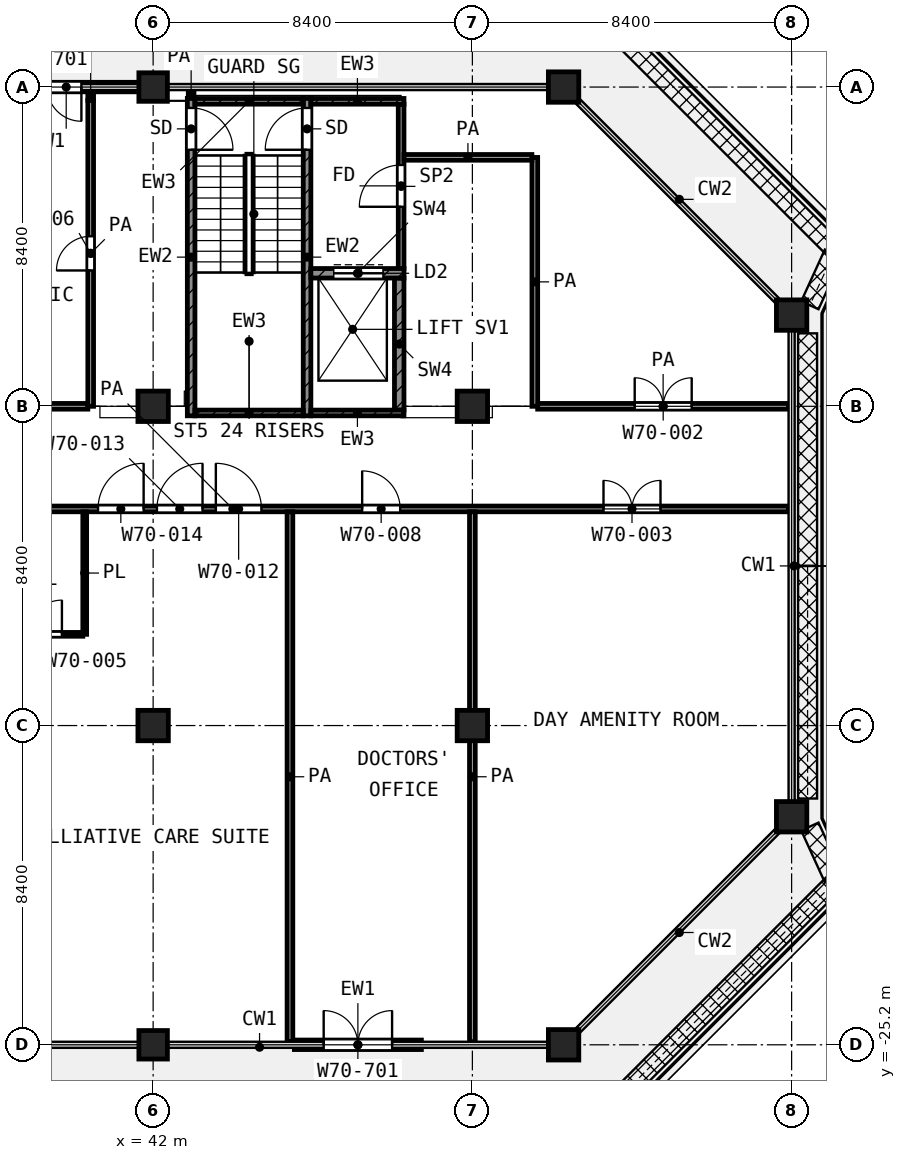
"""IFC4 building model, lengths in metres.
Left out: names, types, materials, properties, quantities, classifications, styles, units other than length and angle.
Written with IfcOpenShell. Run it as: python <this file> out.ifc"""

import sys

from ifc_helpers import new_model, si_unit, direction, frame, frame_2d, origin, origin_2d, place, context, subcontext, project, spatial, rectangle, extrude, element, fill, save


model = new_model("IFC4")
c1 = context("Model", 3, precision=1e-05, world=origin(), true_north=direction((0.0, 1.0)))
c2 = subcontext(c1, "Body", "Model", "MODEL_VIEW")
j1 = project(units=[si_unit("LENGTHUNIT", "METRE"), si_unit("PLANEANGLEUNIT", "RADIAN")], contexts=[c1])
p1 = place(None, origin())
s1 = spatial("IfcSite", under=j1, at=p1, CompositionType="ELEMENT")
p2 = place(p1, origin())
s2 = spatial("IfcBuilding", under=s1, at=p2, CompositionType="ELEMENT")
p3 = place(p2, frame((0.0, 0.0, 323.8)))
s3 = spatial("IfcBuildingStorey", under=s2, at=p3, CompositionType="ELEMENT", Elevation=323.8)
p4 = place(p3, frame((42.0, 0.0, 0.0), z_axis=(0.0, 0.0, 1.0), x_axis=(1.0, 0.0, 0.0)))
e1 = element("IfcColumn", 1, at=p4, inside=s3, PredefinedType="COLUMN", context=c2, shape_type="SweptSolid", body=[
    extrude(rectangle(XDim=0.75, YDim=0.75, at=origin_2d()), origin(), (0.0, 0.0, 1.0), 4.2),
])
for number, where, z_axis, x_axis in (
    (2, (52.8, 0.0, 0.0), (0.0, 0.0, 1.0), (1.0, 0.0, 0.0)),
    (3, (58.8, -6.0, 0.0), (0.0, 0.0, 1.0), (1.0, 0.0, 0.0)),
    (4, (42.0, -8.4, 0.0), (0.0, 0.0, 1.0), (1.0, 0.0, 0.0)),
    (5, (50.4, -8.4, 0.0), (0.0, 0.0, 1.0), (1.0, 0.0, 0.0)),
    (6, (42.0, -16.8, 0.0), (0.0, 0.0, 1.0), (1.0, 0.0, 0.0)),
    (7, (50.4, -16.8, 0.0), (0.0, 0.0, 1.0), (1.0, 0.0, 0.0)),
    (8, (58.8, -19.2, 0.0), (0.0, 0.0, 1.0), (1.0, 0.0, 0.0)),
):
    element("IfcColumn", number, at=place(p3, frame(where, z_axis=z_axis, x_axis=x_axis)), inside=s3, PredefinedType="COLUMN", context=c2, shape_type="SweptSolid", body=[
        extrude(rectangle(XDim=0.8, YDim=0.8, at=origin_2d()), origin(), (0.0, 0.0, 1.0), 4.2),
    ])
p5 = place(p3, frame((42.0, -25.2, 0.0), z_axis=(0.0, 0.0, 1.0), x_axis=(1.0, 0.0, 0.0)))
e9 = element("IfcColumn", 9, at=p5, inside=s3, PredefinedType="COLUMN", context=c2, shape_type="SweptSolid", body=[
    extrude(rectangle(XDim=0.75, YDim=0.75, at=origin_2d()), origin(), (0.0, 0.0, 1.0), 4.2),
])
p6 = place(p3, frame((52.8, -25.2, 0.0), z_axis=(0.0, 0.0, 1.0), x_axis=(1.0, 0.0, 0.0)))
e10 = element("IfcColumn", 10, at=p6, inside=s3, PredefinedType="COLUMN", context=c2, shape_type="SweptSolid", body=[
    extrude(rectangle(XDim=0.8, YDim=0.8, at=origin_2d()), origin(), (0.0, 0.0, 1.0), 4.2),
])
p7 = place(p3, frame((45.717, -25.2, 0.0), z_axis=(0.0, 0.0, 1.0), x_axis=(1.0, 0.0, 0.0)))
e11 = element("IfcWall", 11, at=p7, inside=s3, PredefinedType="SOLIDWALL", context=c2, shape_type="SweptSolid", body=[
    extrude(rectangle(XDim=3.342, YDim=0.25, at=frame_2d((1.671, 0.0))), origin(), (0.0, 0.0, 1.0), 3.48),
])
p8 = place(p7, frame((0.771, 0.0, 0.0)))
e12 = element("IfcOpeningElement", 12, at=p8, cuts=e11, PredefinedType="OPENING", context=c2, shape_type="SweptSolid", body=[
    extrude(rectangle(XDim=1.8, YDim=2.1, at=frame_2d((0.9, 1.05))), frame((0.0, 0.135, 0.0), z_axis=(0.0, -1.0, 0.0), x_axis=(1.0, 0.0, 0.0)), (0.0, 0.0, 1.0), 0.27),
])
p9 = place(p3, frame((41.625, 0.0, 0.0), z_axis=(0.0, 0.0, 1.0), x_axis=(-1.0, 0.0, 0.0)))
e13 = element("IfcWall", 13, at=p9, inside=s3, PredefinedType="SOLIDWALL", context=c2, shape_type="SweptSolid", body=[
    extrude(rectangle(XDim=3.825, YDim=0.25, at=frame_2d((1.913, 0.0))), origin(), (0.0, 0.0, 1.0), 3.48),
])
p10 = place(p9, frame((1.512, 0.0, 0.0)))
e14 = element("IfcOpeningElement", 14, at=p10, cuts=e13, PredefinedType="OPENING", context=c2, shape_type="SweptSolid", body=[
    extrude(rectangle(XDim=1.8, YDim=2.1, at=frame_2d((0.9, 1.05))), frame((0.0, 0.135, 0.0), z_axis=(0.0, -1.0, 0.0), x_axis=(1.0, 0.0, 0.0)), (0.0, 0.0, 1.0), 0.27),
])
p11 = place(p3, frame((43.0, -8.65, 0.0), z_axis=(0.0, 0.0, 1.0), x_axis=(0.0, 1.0, 0.0)))
e15 = element("IfcWall", 15, at=p11, inside=s3, PredefinedType="SHEAR", context=c2, shape_type="SweptSolid", body=[
    extrude(rectangle(XDim=8.35, YDim=0.2, at=frame_2d((4.175, 0.0))), origin(), (0.0, 0.0, 1.0), 3.6),
])
p12 = place(p11, frame((7.0, 0.0, 0.0)))
e16 = element("IfcOpeningElement", 16, at=p12, cuts=e15, PredefinedType="OPENING", context=c2, shape_type="SweptSolid", body=[
    extrude(rectangle(XDim=1.1, YDim=2.1, at=frame_2d((0.55, 1.05))), frame((0.0, 0.11, 0.0), z_axis=(0.0, -1.0, 0.0), x_axis=(1.0, 0.0, 0.0)), (0.0, 0.0, 1.0), 0.22),
])
p13 = place(p3, frame((46.05, -8.65, 0.0), z_axis=(0.0, 0.0, 1.0), x_axis=(0.0, 1.0, 0.0)))
e17 = element("IfcWall", 17, at=p13, inside=s3, PredefinedType="SHEAR", context=c2, shape_type="SweptSolid", body=[
    extrude(rectangle(XDim=8.35, YDim=0.2, at=frame_2d((4.175, 0.0))), origin(), (0.0, 0.0, 1.0), 3.6),
])
p14 = place(p13, frame((7.0, 0.0, 0.0)))
e18 = element("IfcOpeningElement", 18, at=p14, cuts=e17, PredefinedType="OPENING", context=c2, shape_type="SweptSolid", body=[
    extrude(rectangle(XDim=1.1, YDim=2.1, at=frame_2d((0.55, 1.05))), frame((0.0, 0.11, 0.0), z_axis=(0.0, -1.0, 0.0), x_axis=(1.0, 0.0, 0.0)), (0.0, 0.0, 1.0), 0.22),
])
p15 = place(p3, frame((43.1, -0.375, 0.0), z_axis=(0.0, 0.0, 1.0), x_axis=(1.0, 0.0, 0.0)))
e19 = element("IfcWall", 19, at=p15, inside=s3, PredefinedType="SHEAR", context=c2, shape_type="SweptSolid", body=[
    extrude(rectangle(XDim=2.85, YDim=0.15, at=frame_2d((1.425, 0.0))), origin(), (0.0, 0.0, 1.0), 3.6),
])
p16 = place(p3, frame((46.15, -0.375, 0.0), z_axis=(0.0, 0.0, 1.0), x_axis=(1.0, 0.0, 0.0)))
e20 = element("IfcWall", 20, at=p16, inside=s3, PredefinedType="SHEAR", context=c2, shape_type="SweptSolid", body=[
    extrude(rectangle(XDim=2.45, YDim=0.15, at=frame_2d((1.225, 0.0))), origin(), (0.0, 0.0, 1.0), 3.6),
])
p17 = place(p3, frame((43.1, -8.575, 0.0), z_axis=(0.0, 0.0, 1.0), x_axis=(1.0, 0.0, 0.0)))
e21 = element("IfcWall", 21, at=p17, inside=s3, PredefinedType="SHEAR", context=c2, shape_type="SweptSolid", body=[
    extrude(rectangle(XDim=2.85, YDim=0.15, at=frame_2d((1.425, 0.0))), origin(), (0.0, 0.0, 1.0), 3.6),
])
p18 = place(p3, frame((46.15, -8.575, 0.0), z_axis=(0.0, 0.0, 1.0), x_axis=(1.0, 0.0, 0.0)))
e22 = element("IfcWall", 22, at=p18, inside=s3, PredefinedType="SHEAR", context=c2, shape_type="SweptSolid", body=[
    extrude(rectangle(XDim=2.45, YDim=0.15, at=frame_2d((1.225, 0.0))), origin(), (0.0, 0.0, 1.0), 3.6),
])
p19 = place(p3, frame((46.15, -4.9, 0.0), z_axis=(0.0, 0.0, 1.0), x_axis=(1.0, 0.0, 0.0)))
e23 = element("IfcWall", 23, at=p19, inside=s3, PredefinedType="SHEAR", context=c2, shape_type="SweptSolid", body=[
    extrude(rectangle(XDim=2.45, YDim=0.25, at=frame_2d((1.225, 0.0))), origin(), (0.0, 0.0, 1.0), 3.6),
])
p20 = place(p19, frame((0.6, 0.0, 0.0)))
e24 = element("IfcOpeningElement", 24, at=p20, cuts=e23, PredefinedType="OPENING", context=c2, shape_type="SweptSolid", body=[
    extrude(rectangle(XDim=1.3, YDim=2.1, at=frame_2d((0.65, 1.05))), frame((0.0, 0.135, 0.0), z_axis=(0.0, -1.0, 0.0), x_axis=(1.0, 0.0, 0.0)), (0.0, 0.0, 1.0), 0.27),
])
p21 = place(p3, frame((48.475, -8.5, 0.0), z_axis=(0.0, 0.0, 1.0), x_axis=(0.0, 1.0, 0.0)))
e25 = element("IfcWall", 25, at=p21, inside=s3, PredefinedType="SHEAR", context=c2, shape_type="SweptSolid", body=[
    extrude(rectangle(XDim=3.475, YDim=0.25, at=frame_2d((1.738, 0.0))), origin(), (0.0, 0.0, 1.0), 3.6),
])
p22 = place(p3, frame((48.525, -4.775, 0.0), z_axis=(0.0, 0.0, 1.0), x_axis=(0.0, 1.0, 0.0)))
e26 = element("IfcWall", 26, at=p22, inside=s3, PredefinedType="PARTITIONING", context=c2, shape_type="SweptSolid", body=[
    extrude(rectangle(XDim=4.325, YDim=0.15, at=frame_2d((2.163, 0.0))), origin(), (0.0, 0.0, 1.0), 3.6),
])
p23 = place(p22, frame((1.625, 0.0, 0.0)))
e27 = element("IfcOpeningElement", 27, at=p23, cuts=e26, PredefinedType="OPENING", context=c2, shape_type="SweptSolid", body=[
    extrude(rectangle(XDim=1.1, YDim=2.1, at=frame_2d((0.55, 1.05))), frame((0.0, 0.085, 0.0), z_axis=(0.0, -1.0, 0.0), x_axis=(1.0, 0.0, 0.0)), (0.0, 0.0, 1.0), 0.17),
])
p24 = place(p3, frame((38.175, -14.4, 0.0), z_axis=(0.0, 0.0, 1.0), x_axis=(1.0, 0.0, 0.0)))
e28 = element("IfcWall", 28, at=p24, inside=s3, PredefinedType="PARTITIONING", context=c2, shape_type="SweptSolid", body=[
    extrude(rectangle(XDim=1.975, YDim=0.1, at=frame_2d((0.987, 0.0))), origin(), (0.0, 0.0, 1.0), 3.6),
])
p25 = place(p24, frame((0.525, 0.0, 0.0)))
e29 = element("IfcOpeningElement", 29, at=p25, cuts=e28, PredefinedType="OPENING", context=c2, shape_type="SweptSolid", body=[
    extrude(rectangle(XDim=0.9, YDim=2.1, at=frame_2d((0.45, 1.05))), frame((0.0, 0.06, 0.0), z_axis=(0.0, -1.0, 0.0), x_axis=(1.0, 0.0, 0.0)), (0.0, 0.0, 1.0), 0.12),
])
p26 = place(p3, frame((40.2, -14.4, 0.0), z_axis=(0.0, 0.0, 1.0), x_axis=(0.0, 1.0, 0.0)))
e30 = element("IfcWall", 30, at=p26, inside=s3, PredefinedType="PARTITIONING", context=c2, shape_type="SweptSolid", body=[
    extrude(rectangle(XDim=3.225, YDim=0.1, at=frame_2d((1.612, 0.0))), origin(), (0.0, 0.0, 1.0), 3.6),
])
p27 = place(p3, frame((29.475, -11.1, 0.0), z_axis=(0.0, 0.0, 1.0), x_axis=(1.0, 0.0, 0.0)))
e31 = element("IfcWall", 31, at=p27, inside=s3, PredefinedType="PARTITIONING", context=c2, shape_type="SweptSolid", body=[
    extrude(rectangle(XDim=29.245, YDim=0.15, at=frame_2d((14.623, 0.0))), origin(), (0.0, 0.0, 1.0), 3.6),
])
p28 = place(p27, frame((3.675, 0.0, 0.0)))
e32 = element("IfcOpeningElement", 32, at=p28, cuts=e31, PredefinedType="OPENING", context=c2, shape_type="SweptSolid", body=[
    extrude(rectangle(XDim=1.2, YDim=2.1, at=frame_2d((0.6, 1.05))), frame((0.0, 0.085, 0.0), z_axis=(0.0, -1.0, 0.0), x_axis=(1.0, 0.0, 0.0)), (0.0, 0.0, 1.0), 0.17),
])
p29 = place(p27, frame((14.175, 0.0, 0.0)))
e33 = element("IfcOpeningElement", 33, at=p29, cuts=e31, PredefinedType="OPENING", context=c2, shape_type="SweptSolid", body=[
    extrude(rectangle(XDim=1.2, YDim=2.1, at=frame_2d((0.6, 1.05))), frame((0.0, 0.085, 0.0), z_axis=(0.0, -1.0, 0.0), x_axis=(1.0, 0.0, 0.0)), (0.0, 0.0, 1.0), 0.17),
])
p30 = place(p27, frame((12.625, 0.0, 0.0)))
e34 = element("IfcOpeningElement", 34, at=p30, cuts=e31, PredefinedType="OPENING", context=c2, shape_type="SweptSolid", body=[
    extrude(rectangle(XDim=1.2, YDim=2.1, at=frame_2d((0.6, 1.05))), frame((0.0, 0.085, 0.0), z_axis=(0.0, -1.0, 0.0), x_axis=(1.0, 0.0, 0.0)), (0.0, 0.0, 1.0), 0.17),
])
p31 = place(p27, frame((11.075, 0.0, 0.0)))
e35 = element("IfcOpeningElement", 35, at=p31, cuts=e31, PredefinedType="OPENING", context=c2, shape_type="SweptSolid", body=[
    extrude(rectangle(XDim=1.2, YDim=2.1, at=frame_2d((0.6, 1.05))), frame((0.0, 0.085, 0.0), z_axis=(0.0, -1.0, 0.0), x_axis=(1.0, 0.0, 0.0)), (0.0, 0.0, 1.0), 0.17),
])
p32 = place(p27, frame((18.025, 0.0, 0.0)))
e36 = element("IfcOpeningElement", 36, at=p32, cuts=e31, PredefinedType="OPENING", context=c2, shape_type="SweptSolid", body=[
    extrude(rectangle(XDim=1.0, YDim=2.1, at=frame_2d((0.5, 1.05))), frame((0.0, 0.085, 0.0), z_axis=(0.0, -1.0, 0.0), x_axis=(1.0, 0.0, 0.0)), (0.0, 0.0, 1.0), 0.17),
])
p33 = place(p27, frame((24.375, 0.0, 0.0)))
e37 = element("IfcOpeningElement", 37, at=p33, cuts=e31, PredefinedType="OPENING", context=c2, shape_type="SweptSolid", body=[
    extrude(rectangle(XDim=1.5, YDim=2.1, at=frame_2d((0.75, 1.05))), frame((0.0, 0.085, 0.0), z_axis=(0.0, -1.0, 0.0), x_axis=(1.0, 0.0, 0.0)), (0.0, 0.0, 1.0), 0.17),
])
p34 = place(p3, frame((24.7, -8.4, 0.0), z_axis=(0.0, 0.0, 1.0), x_axis=(1.0, 0.0, 0.0)))
e38 = element("IfcWall", 38, at=p34, inside=s3, PredefinedType="PARTITIONING", context=c2, shape_type="SweptSolid", body=[
    extrude(rectangle(XDim=15.582, YDim=0.15, at=frame_2d((7.791, 0.0))), origin(), (0.0, 0.0, 1.0), 3.6),
])
p35 = place(p34, frame((9.35, 0.0, 0.0)))
e39 = element("IfcOpeningElement", 39, at=p35, cuts=e38, PredefinedType="OPENING", context=c2, shape_type="SweptSolid", body=[
    extrude(rectangle(XDim=1.1, YDim=2.1, at=frame_2d((0.55, 1.05))), frame((0.0, 0.085, 0.0), z_axis=(0.0, -1.0, 0.0), x_axis=(1.0, 0.0, 0.0)), (0.0, 0.0, 1.0), 0.17),
])
p36 = place(p34, frame((1.05, 0.0, 0.0)))
e40 = element("IfcOpeningElement", 40, at=p36, cuts=e38, PredefinedType="OPENING", context=c2, shape_type="SweptSolid", body=[
    extrude(rectangle(XDim=1.0, YDim=2.1, at=frame_2d((0.5, 1.05))), frame((0.0, 0.085, 0.0), z_axis=(0.0, -1.0, 0.0), x_axis=(1.0, 0.0, 0.0)), (0.0, 0.0, 1.0), 0.17),
])
p37 = place(p34, frame((5.15, 0.0, 0.0)))
e41 = element("IfcOpeningElement", 41, at=p37, cuts=e38, PredefinedType="OPENING", context=c2, shape_type="SweptSolid", body=[
    extrude(rectangle(XDim=1.2, YDim=2.1, at=frame_2d((0.6, 1.05))), frame((0.0, 0.085, 0.0), z_axis=(0.0, -1.0, 0.0), x_axis=(1.0, 0.0, 0.0)), (0.0, 0.0, 1.0), 0.17),
])
p38 = place(p3, frame((52.118, -8.4, 0.0), z_axis=(0.0, 0.0, 1.0), x_axis=(1.0, 0.0, 0.0)))
e42 = element("IfcWall", 42, at=p38, inside=s3, PredefinedType="PARTITIONING", context=c2, shape_type="SweptSolid", body=[
    extrude(rectangle(XDim=6.602, YDim=0.15, at=frame_2d((3.301, 0.0))), origin(), (0.0, 0.0, 1.0), 3.6),
])
p39 = place(p38, frame((2.553, 0.0, 0.0)))
e43 = element("IfcOpeningElement", 43, at=p39, cuts=e42, PredefinedType="OPENING", context=c2, shape_type="SweptSolid", body=[
    extrude(rectangle(XDim=1.5, YDim=2.1, at=frame_2d((0.75, 1.05))), frame((0.0, 0.085, 0.0), z_axis=(0.0, -1.0, 0.0), x_axis=(1.0, 0.0, 0.0)), (0.0, 0.0, 1.0), 0.17),
])
p40 = place(p3, frame((48.6, -1.85, 0.0), z_axis=(0.0, 0.0, 1.0), x_axis=(1.0, 0.0, 0.0)))
e44 = element("IfcWall", 44, at=p40, inside=s3, PredefinedType="PARTITIONING", context=c2, shape_type="SweptSolid", body=[
    extrude(rectangle(XDim=3.366, YDim=0.15, at=frame_2d((1.683, 0.0))), origin(), (0.0, 0.0, 1.0), 3.6),
])
p41 = place(p3, frame((40.357, -8.4, 0.0), z_axis=(0.0, 0.0, 1.0), x_axis=(0.0, 1.0, 0.0)))
e45 = element("IfcWall", 45, at=p41, inside=s3, PredefinedType="PARTITIONING", context=c2, shape_type="SweptSolid", body=[
    extrude(rectangle(XDim=8.048, YDim=0.15, at=frame_2d((4.024, 0.0))), origin(), (0.0, 0.0, 1.0), 3.6),
])
p42 = place(p41, frame((3.574, 0.0, 0.0)))
e46 = element("IfcOpeningElement", 46, at=p42, cuts=e45, PredefinedType="OPENING", context=c2, shape_type="SweptSolid", body=[
    extrude(rectangle(XDim=0.9, YDim=2.1, at=frame_2d((0.45, 1.05))), frame((0.0, 0.085, 0.0), z_axis=(0.0, -1.0, 0.0), x_axis=(1.0, 0.0, 0.0)), (0.0, 0.0, 1.0), 0.17),
])
p43 = place(p3, frame((40.357, -0.35, 0.0), z_axis=(0.0, 0.0, 1.0), x_axis=(0.0, 1.0, 0.0)))
e47 = element("IfcWall", 47, at=p43, inside=s3, PredefinedType="PARTITIONING", context=c2, shape_type="SweptSolid", body=[
    extrude(rectangle(XDim=0.27, YDim=0.15, at=frame_2d((0.135, 0.0))), origin(), (0.0, 0.0, 1.0), 3.6),
])
p44 = place(p3, frame((43.0, -0.27, 0.0), z_axis=(0.0, 0.0, 1.0), x_axis=(0.0, 1.0, 0.0)))
e48 = element("IfcWall", 48, at=p44, inside=s3, PredefinedType="PARTITIONING", context=c2, shape_type="SweptSolid", body=[
    extrude(rectangle(XDim=0.19, YDim=0.15, at=frame_2d((0.095, 0.0))), origin(), (0.0, 0.0, 1.0), 3.6),
])
for number, where, z_axis, x_axis in (
    (49, (45.6, -25.12, 0.0), (0.0, 0.0, 1.0), (0.0, 1.0, 0.0)),
    (50, (50.4, -25.12, 0.0), (0.0, 0.0, 1.0), (0.0, 1.0, 0.0)),
):
    element("IfcWall", number, at=place(p3, frame(where, z_axis=z_axis, x_axis=x_axis)), inside=s3, PredefinedType="PARTITIONING", context=c2, shape_type="SweptSolid", body=[
        extrude(rectangle(XDim=13.945, YDim=0.15, at=frame_2d((6.973, 0.0))), origin(), (0.0, 0.0, 1.0), 3.6),
    ])
p45 = place(p3, frame((52.043, -8.4, 0.0), z_axis=(0.0, 0.0, 1.0), x_axis=(0.0, 1.0, 0.0)))
e51 = element("IfcWall", 51, at=p45, inside=s3, PredefinedType="PARTITIONING", context=c2, shape_type="SweptSolid", body=[
    extrude(rectangle(XDim=6.548, YDim=0.15, at=frame_2d((3.274, 0.0))), origin(), (0.0, 0.0, 1.0), 3.6),
])
p46 = place(p8, origin())
e52 = element("IfcDoor", 52, at=p46, inside=s3, OperationType="DOUBLE_DOOR_SINGLE_SWING", PredefinedType="DOOR", context=c2, shape_type="SweptSolid", body=[
    extrude(rectangle(XDim=1.8, YDim=2.1, at=frame_2d((0.9, 1.05))), frame((0.0, 0.025, 0.0), z_axis=(0.0, -1.0, 0.0), x_axis=(1.0, 0.0, 0.0)), (0.0, 0.0, 1.0), 0.05),
])
fill(e12, e52)
p47 = place(p10, origin())
e53 = element("IfcDoor", 53, at=p47, inside=s3, OperationType="DOUBLE_DOOR_SINGLE_SWING", PredefinedType="DOOR", context=c2, shape_type="SweptSolid", body=[
    extrude(rectangle(XDim=1.8, YDim=2.1, at=frame_2d((0.9, 1.05))), frame((0.0, 0.025, 0.0), z_axis=(0.0, -1.0, 0.0), x_axis=(1.0, 0.0, 0.0)), (0.0, 0.0, 1.0), 0.05),
])
fill(e14, e53)
p48 = place(p12, frame((1.1, 0.0, 0.0), z_axis=(0.0, 0.0, 1.0), x_axis=(-1.0, 0.0, 0.0)))
e54 = element("IfcDoor", 54, at=p48, inside=s3, OperationType="SINGLE_SWING_LEFT", PredefinedType="DOOR", context=c2, shape_type="SweptSolid", body=[
    extrude(rectangle(XDim=1.1, YDim=2.1, at=frame_2d((0.55, 1.05))), frame((0.0, 0.025, 0.0), z_axis=(0.0, -1.0, 0.0), x_axis=(1.0, 0.0, 0.0)), (0.0, 0.0, 1.0), 0.05),
])
fill(e16, e54)
p49 = place(p14, origin())
e55 = element("IfcDoor", 55, at=p49, inside=s3, OperationType="SINGLE_SWING_LEFT", PredefinedType="DOOR", context=c2, shape_type="SweptSolid", body=[
    extrude(rectangle(XDim=1.1, YDim=2.1, at=frame_2d((0.55, 1.05))), frame((0.0, 0.025, 0.0), z_axis=(0.0, -1.0, 0.0), x_axis=(1.0, 0.0, 0.0)), (0.0, 0.0, 1.0), 0.05),
])
fill(e18, e55)
p50 = place(p20, origin())
e56 = element("IfcDoor", 56, at=p50, inside=s3, OperationType="DOUBLE_DOOR_SLIDING", PredefinedType="DOOR", context=c2, shape_type="SweptSolid", body=[
    extrude(rectangle(XDim=1.3, YDim=2.1, at=frame_2d((0.65, 1.05))), frame((0.0, 0.025, 0.0), z_axis=(0.0, -1.0, 0.0), x_axis=(1.0, 0.0, 0.0)), (0.0, 0.0, 1.0), 0.05),
])
fill(e24, e56)
p51 = place(p23, origin())
e57 = element("IfcDoor", 57, at=p51, inside=s3, OperationType="SINGLE_SWING_LEFT", PredefinedType="DOOR", context=c2, shape_type="SweptSolid", body=[
    extrude(rectangle(XDim=1.1, YDim=2.1, at=frame_2d((0.55, 1.05))), frame((0.0, 0.025, 0.0), z_axis=(0.0, -1.0, 0.0), x_axis=(1.0, 0.0, 0.0)), (0.0, 0.0, 1.0), 0.05),
])
fill(e27, e57)
p52 = place(p39, origin())
e58 = element("IfcDoor", 58, at=p52, inside=s3, OperationType="DOUBLE_DOOR_SINGLE_SWING", PredefinedType="DOOR", context=c2, shape_type="SweptSolid", body=[
    extrude(rectangle(XDim=1.5, YDim=2.1, at=frame_2d((0.75, 1.05))), frame((0.0, 0.025, 0.0), z_axis=(0.0, -1.0, 0.0), x_axis=(1.0, 0.0, 0.0)), (0.0, 0.0, 1.0), 0.05),
])
fill(e43, e58)
p53 = place(p29, origin())
e59 = element("IfcDoor", 59, at=p53, inside=s3, OperationType="SINGLE_SWING_LEFT", PredefinedType="DOOR", context=c2, shape_type="SweptSolid", body=[
    extrude(rectangle(XDim=1.2, YDim=2.1, at=frame_2d((0.6, 1.05))), frame((0.0, 0.025, 0.0), z_axis=(0.0, -1.0, 0.0), x_axis=(1.0, 0.0, 0.0)), (0.0, 0.0, 1.0), 0.05),
])
fill(e33, e59)
p54 = place(p30, origin())
e60 = element("IfcDoor", 60, at=p54, inside=s3, OperationType="SINGLE_SWING_RIGHT", PredefinedType="DOOR", context=c2, shape_type="SweptSolid", body=[
    extrude(rectangle(XDim=1.2, YDim=2.1, at=frame_2d((0.6, 1.05))), frame((0.0, 0.025, 0.0), z_axis=(0.0, -1.0, 0.0), x_axis=(1.0, 0.0, 0.0)), (0.0, 0.0, 1.0), 0.05),
])
fill(e34, e60)
p55 = place(p31, origin())
e61 = element("IfcDoor", 61, at=p55, inside=s3, OperationType="SINGLE_SWING_RIGHT", PredefinedType="DOOR", context=c2, shape_type="SweptSolid", body=[
    extrude(rectangle(XDim=1.2, YDim=2.1, at=frame_2d((0.6, 1.05))), frame((0.0, 0.025, 0.0), z_axis=(0.0, -1.0, 0.0), x_axis=(1.0, 0.0, 0.0)), (0.0, 0.0, 1.0), 0.05),
])
fill(e35, e61)
p56 = place(p25, origin())
e62 = element("IfcDoor", 62, at=p56, inside=s3, OperationType="SINGLE_SWING_RIGHT", PredefinedType="DOOR", context=c2, shape_type="SweptSolid", body=[
    extrude(rectangle(XDim=0.9, YDim=2.1, at=frame_2d((0.45, 1.05))), frame((0.0, 0.025, 0.0), z_axis=(0.0, -1.0, 0.0), x_axis=(1.0, 0.0, 0.0)), (0.0, 0.0, 1.0), 0.05),
])
fill(e29, e62)
p57 = place(p32, origin())
e63 = element("IfcDoor", 63, at=p57, inside=s3, OperationType="SINGLE_SWING_LEFT", PredefinedType="DOOR", context=c2, shape_type="SweptSolid", body=[
    extrude(rectangle(XDim=1.0, YDim=2.1, at=frame_2d((0.5, 1.05))), frame((0.0, 0.025, 0.0), z_axis=(0.0, -1.0, 0.0), x_axis=(1.0, 0.0, 0.0)), (0.0, 0.0, 1.0), 0.05),
])
fill(e36, e63)
p58 = place(p33, origin())
e64 = element("IfcDoor", 64, at=p58, inside=s3, OperationType="DOUBLE_DOOR_SINGLE_SWING", PredefinedType="DOOR", context=c2, shape_type="SweptSolid", body=[
    extrude(rectangle(XDim=1.5, YDim=2.1, at=frame_2d((0.75, 1.05))), frame((0.0, 0.025, 0.0), z_axis=(0.0, -1.0, 0.0), x_axis=(1.0, 0.0, 0.0)), (0.0, 0.0, 1.0), 0.05),
])
fill(e37, e64)
p59 = place(p42, origin())
e65 = element("IfcDoor", 65, at=p59, inside=s3, OperationType="SINGLE_SWING_LEFT", PredefinedType="DOOR", context=c2, shape_type="SweptSolid", body=[
    extrude(rectangle(XDim=0.9, YDim=2.1, at=frame_2d((0.45, 1.05))), frame((0.0, 0.025, 0.0), z_axis=(0.0, -1.0, 0.0), x_axis=(1.0, 0.0, 0.0)), (0.0, 0.0, 1.0), 0.05),
])
fill(e46, e65)
save(model, sys.argv[1])
